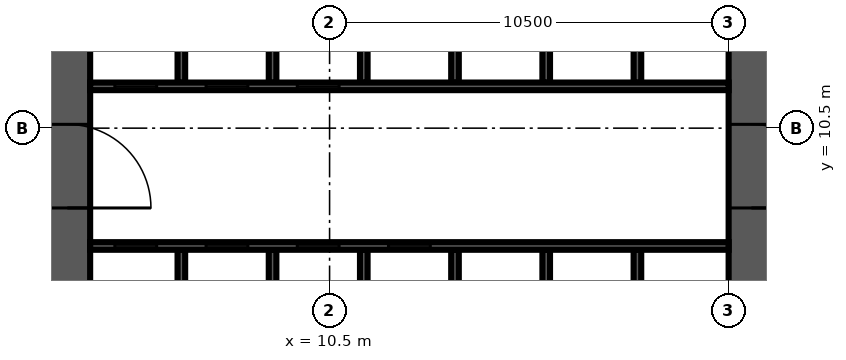
"""IFC4 building model, lengths in metres.
Left out: names, types, materials, properties, quantities, classifications, styles, units other than length and angle.
Written with IfcOpenShell. Run it as: python <this file> out.ifc"""

import sys

from ifc_helpers import new_model, si_unit, direction, frame, frame_2d, origin, place, context, subcontext, project, spatial, rectangle, extrude, source, transform, mapped, element, fill, save


model = new_model("IFC4")
c1 = context("Model", 3, precision=1e-05, world=origin(), true_north=direction((0.0, 1.0)))
c2 = subcontext(c1, "Body", "Model", "MODEL_VIEW")
j1 = project(units=[si_unit("LENGTHUNIT", "METRE"), si_unit("PLANEANGLEUNIT", "RADIAN")], contexts=[c1])
p1 = place(None, origin())
s1 = spatial("IfcSite", under=j1, at=p1, CompositionType="ELEMENT")
p2 = place(p1, origin())
s2 = spatial("IfcBuilding", under=s1, at=p2, CompositionType="ELEMENT")
p3 = place(p2, frame((0.0, 0.0, 78.3)))
s3 = spatial("IfcBuildingStorey", under=s2, at=p3, CompositionType="ELEMENT", Elevation=78.3)
m1 = source(origin(), c2, "Body", "SweptSolid", [
    extrude(rectangle(XDim=18.0, YDim=1.2, at=frame_2d((9.0, 0.0))), origin(), (0.0, 0.0, 1.0), 4.2),
])
p4 = place(p3, frame((3.6, 4.2, 0.0), z_axis=(0.0, 0.0, 1.0), x_axis=(0.0, 1.0, 0.0)))
e1 = element("IfcWall", 1, at=p4, inside=s3, PredefinedType="SHEAR", context=c2, shape_type="MappedRepresentation", body=[
    mapped(m1, transform((0.0, 0.0, 0.0), scale=1.0)),
])
m2 = source(origin(), c2, "Body", "SweptSolid", [
    extrude(rectangle(XDim=2.2, YDim=2.1, at=frame_2d((1.1, 1.05))), frame((0.0, 0.61, 0.0), z_axis=(0.0, -1.0, 0.0), x_axis=(1.0, 0.0, 0.0)), (0.0, 0.0, 1.0), 1.22),
])
p5 = place(p4, frame((4.2, 0.0, 0.0)))
e2 = element("IfcOpeningElement", 2, at=p5, cuts=e1, PredefinedType="OPENING", context=c2, shape_type="MappedRepresentation", body=[
    mapped(m2, transform((0.0, 0.0, 0.0), scale=1.0)),
])
m3 = source(origin(), c2, "Body", "SweptSolid", [
    extrude(rectangle(XDim=16.8, YDim=1.2, at=frame_2d((8.4, 0.0))), origin(), (0.0, 0.0, 1.0), 4.2),
])
p6 = place(p3, frame((21.6, 4.2, 0.0), z_axis=(0.0, 0.0, 1.0), x_axis=(0.0, 1.0, 0.0)))
e3 = element("IfcWall", 3, at=p6, inside=s3, PredefinedType="SHEAR", context=c2, shape_type="MappedRepresentation", body=[
    mapped(m3, transform((0.0, 0.0, 0.0), scale=1.0)),
])
p7 = place(p6, frame((4.2, 0.0, 0.0)))
e4 = element("IfcOpeningElement", 4, at=p7, cuts=e3, PredefinedType="OPENING", context=c2, shape_type="MappedRepresentation", body=[
    mapped(m2, transform((0.0, 0.0, 0.0), scale=1.0)),
])
m4 = source(origin(), c2, "Body", "SweptSolid", [
    extrude(rectangle(XDim=1.2, YDim=2.1, at=frame_2d((0.6, 1.05))), frame((0.0, 0.61, 0.0), z_axis=(0.0, -1.0, 0.0), x_axis=(1.0, 0.0, 0.0)), (0.0, 0.0, 1.0), 1.22),
])
p8 = place(p6, frame((14.7, 0.0, 0.0)))
e5 = element("IfcOpeningElement", 5, at=p8, cuts=e3, PredefinedType="OPENING", context=c2, shape_type="MappedRepresentation", body=[
    mapped(m4, transform((0.0, 0.0, 0.0), scale=1.0)),
])
m5 = source(origin(), c2, "Body", "SweptSolid", [
    extrude(rectangle(XDim=3.1, YDim=0.2, at=frame_2d((1.55, 0.0))), origin(), (0.0, 0.0, 1.0), 4.2),
])
for number, where, z_axis, x_axis in (
    (6, (6.6, 4.2, 0.0), (0.0, 0.0, 1.0), (0.0, 1.0, 0.0)),
    (7, (9.0, 4.2, 0.0), (0.0, 0.0, 1.0), (0.0, 1.0, 0.0)),
    (8, (11.4, 4.2, 0.0), (0.0, 0.0, 1.0), (0.0, 1.0, 0.0)),
    (9, (13.8, 4.2, 0.0), (0.0, 0.0, 1.0), (0.0, 1.0, 0.0)),
    (10, (16.2, 4.2, 0.0), (0.0, 0.0, 1.0), (0.0, 1.0, 0.0)),
    (11, (18.6, 4.2, 0.0), (0.0, 0.0, 1.0), (0.0, 1.0, 0.0)),
):
    element("IfcWall", number, at=place(p3, frame(where, z_axis=z_axis, x_axis=x_axis)), inside=s3, PredefinedType="SOLIDWALL", context=c2, shape_type="MappedRepresentation", body=[
        mapped(m5, transform((0.0, 0.0, 0.0), scale=1.0)),
    ])
m6 = source(origin(), c2, "Body", "SweptSolid", [
    extrude(rectangle(XDim=3.0, YDim=0.2, at=frame_2d((1.5, 0.0))), origin(), (0.0, 0.0, 1.0), 4.2),
])
for number, where, z_axis, x_axis in (
    (12, (6.6, 11.7, 0.0), (0.0, 0.0, 1.0), (0.0, 1.0, 0.0)),
    (13, (9.0, 11.7, 0.0), (0.0, 0.0, 1.0), (0.0, 1.0, 0.0)),
    (14, (11.4, 11.7, 0.0), (0.0, 0.0, 1.0), (0.0, 1.0, 0.0)),
    (15, (13.8, 11.7, 0.0), (0.0, 0.0, 1.0), (0.0, 1.0, 0.0)),
    (16, (16.2, 11.7, 0.0), (0.0, 0.0, 1.0), (0.0, 1.0, 0.0)),
    (17, (18.6, 11.7, 0.0), (0.0, 0.0, 1.0), (0.0, 1.0, 0.0)),
):
    element("IfcWall", number, at=place(p3, frame(where, z_axis=z_axis, x_axis=x_axis)), inside=s3, PredefinedType="SOLIDWALL", context=c2, shape_type="MappedRepresentation", body=[
        mapped(m6, transform((0.0, 0.0, 0.0), scale=1.0)),
    ])
m7 = source(origin(), c2, "Body", "SweptSolid", [
    extrude(rectangle(XDim=16.8, YDim=0.2, at=frame_2d((8.4, 0.0))), origin(), (0.0, 0.0, 1.0), 4.2),
])
p9 = place(p3, frame((4.2, 7.4, 0.0), z_axis=(0.0, 0.0, 1.0), x_axis=(1.0, 0.0, 0.0)))
e18 = element("IfcWall", 18, at=p9, inside=s3, PredefinedType="SOLIDWALL", context=c2, shape_type="MappedRepresentation", body=[
    mapped(m7, transform((0.0, 0.0, 0.0), scale=1.0)),
])
m8 = source(origin(), c2, "Body", "SweptSolid", [
    extrude(rectangle(XDim=1.1, YDim=2.1, at=frame_2d((0.55, 1.05))), frame((0.0, 0.11, 0.0), z_axis=(0.0, -1.0, 0.0), x_axis=(1.0, 0.0, 0.0)), (0.0, 0.0, 1.0), 0.22),
])
p10 = place(p9, frame((0.65, 0.0, 0.0)))
e19 = element("IfcOpeningElement", 19, at=p10, cuts=e18, PredefinedType="OPENING", context=c2, shape_type="MappedRepresentation", body=[
    mapped(m8, transform((0.0, 0.0, 0.0), scale=1.0)),
])
p11 = place(p9, frame((3.05, 0.0, 0.0)))
e20 = element("IfcOpeningElement", 20, at=p11, cuts=e18, PredefinedType="OPENING", context=c2, shape_type="MappedRepresentation", body=[
    mapped(m8, transform((0.0, 0.0, 0.0), scale=1.0)),
])
p12 = place(p9, frame((5.45, 0.0, 0.0)))
e21 = element("IfcOpeningElement", 21, at=p12, cuts=e18, PredefinedType="OPENING", context=c2, shape_type="MappedRepresentation", body=[
    mapped(m8, transform((0.0, 0.0, 0.0), scale=1.0)),
])
p13 = place(p9, frame((7.85, 0.0, 0.0)))
e22 = element("IfcOpeningElement", 22, at=p13, cuts=e18, PredefinedType="OPENING", context=c2, shape_type="MappedRepresentation", body=[
    mapped(m8, transform((0.0, 0.0, 0.0), scale=1.0)),
])
p14 = place(p3, frame((4.2, 11.6, 0.0), z_axis=(0.0, 0.0, 1.0), x_axis=(1.0, 0.0, 0.0)))
e23 = element("IfcWall", 23, at=p14, inside=s3, PredefinedType="SOLIDWALL", context=c2, shape_type="MappedRepresentation", body=[
    mapped(m7, transform((0.0, 0.0, 0.0), scale=1.0)),
])
p15 = place(p14, frame((0.65, 0.0, 0.0)))
e24 = element("IfcOpeningElement", 24, at=p15, cuts=e23, PredefinedType="OPENING", context=c2, shape_type="MappedRepresentation", body=[
    mapped(m8, transform((0.0, 0.0, 0.0), scale=1.0)),
])
p16 = place(p14, frame((3.05, 0.0, 0.0)))
e25 = element("IfcOpeningElement", 25, at=p16, cuts=e23, PredefinedType="OPENING", context=c2, shape_type="MappedRepresentation", body=[
    mapped(m8, transform((0.0, 0.0, 0.0), scale=1.0)),
])
p17 = place(p14, frame((5.45, 0.0, 0.0)))
e26 = element("IfcOpeningElement", 26, at=p17, cuts=e23, PredefinedType="OPENING", context=c2, shape_type="MappedRepresentation", body=[
    mapped(m8, transform((0.0, 0.0, 0.0), scale=1.0)),
])
m9 = source(origin(), c2, "Body", "SweptSolid", [
    extrude(rectangle(XDim=1.1, YDim=2.1, at=frame_2d((0.55, 1.05))), frame((0.0, 0.025, 0.0), z_axis=(0.0, -1.0, 0.0), x_axis=(1.0, 0.0, 0.0)), (0.0, 0.0, 1.0), 0.05),
])
p18 = place(p10, origin())
e27 = element("IfcDoor", 27, at=p18, inside=s3, OperationType="SLIDING_TO_LEFT", PredefinedType="DOOR", context=c2, shape_type="MappedRepresentation", body=[
    mapped(m9, transform((0.0, 0.0, 0.0), scale=1.0)),
])
fill(e19, e27)
p19 = place(p11, origin())
e28 = element("IfcDoor", 28, at=p19, inside=s3, OperationType="SLIDING_TO_LEFT", PredefinedType="DOOR", context=c2, shape_type="MappedRepresentation", body=[
    mapped(m9, transform((0.0, 0.0, 0.0), scale=1.0)),
])
fill(e20, e28)
p20 = place(p12, origin())
e29 = element("IfcDoor", 29, at=p20, inside=s3, OperationType="SLIDING_TO_LEFT", PredefinedType="DOOR", context=c2, shape_type="MappedRepresentation", body=[
    mapped(m9, transform((0.0, 0.0, 0.0), scale=1.0)),
])
fill(e21, e29)
p21 = place(p13, origin())
e30 = element("IfcDoor", 30, at=p21, inside=s3, OperationType="SLIDING_TO_LEFT", PredefinedType="DOOR", context=c2, shape_type="MappedRepresentation", body=[
    mapped(m9, transform((0.0, 0.0, 0.0), scale=1.0)),
])
fill(e22, e30)
p22 = place(p15, origin())
e31 = element("IfcDoor", 31, at=p22, inside=s3, OperationType="SLIDING_TO_LEFT", PredefinedType="DOOR", context=c2, shape_type="MappedRepresentation", body=[
    mapped(m9, transform((0.0, 0.0, 0.0), scale=1.0)),
])
fill(e24, e31)
p23 = place(p16, origin())
e32 = element("IfcDoor", 32, at=p23, inside=s3, OperationType="SLIDING_TO_LEFT", PredefinedType="DOOR", context=c2, shape_type="MappedRepresentation", body=[
    mapped(m9, transform((0.0, 0.0, 0.0), scale=1.0)),
])
fill(e25, e32)
p24 = place(p17, origin())
e33 = element("IfcDoor", 33, at=p24, inside=s3, OperationType="SLIDING_TO_LEFT", PredefinedType="DOOR", context=c2, shape_type="MappedRepresentation", body=[
    mapped(m9, transform((0.0, 0.0, 0.0), scale=1.0)),
])
fill(e26, e33)
m10 = source(origin(), c2, "Body", "SweptSolid", [
    extrude(rectangle(XDim=2.2, YDim=2.1, at=frame_2d((1.1, 1.05))), frame((0.0, 0.025, 0.0), z_axis=(0.0, -1.0, 0.0), x_axis=(1.0, 0.0, 0.0)), (0.0, 0.0, 1.0), 0.05),
])
p25 = place(p7, origin())
e34 = element("IfcDoor", 34, at=p25, inside=s3, OperationType="DOUBLE_DOOR_SINGLE_SWING", PredefinedType="DOOR", context=c2, shape_type="MappedRepresentation", body=[
    mapped(m10, transform((0.0, 0.0, 0.0), scale=1.0)),
])
fill(e4, e34)
p26 = place(p5, origin())
e35 = element("IfcDoor", 35, at=p26, inside=s3, OperationType="DOUBLE_DOOR_SINGLE_SWING", PredefinedType="DOOR", context=c2, shape_type="MappedRepresentation", body=[
    mapped(m10, transform((0.0, 0.0, 0.0), scale=1.0)),
])
fill(e2, e35)
save(model, sys.argv[1])
